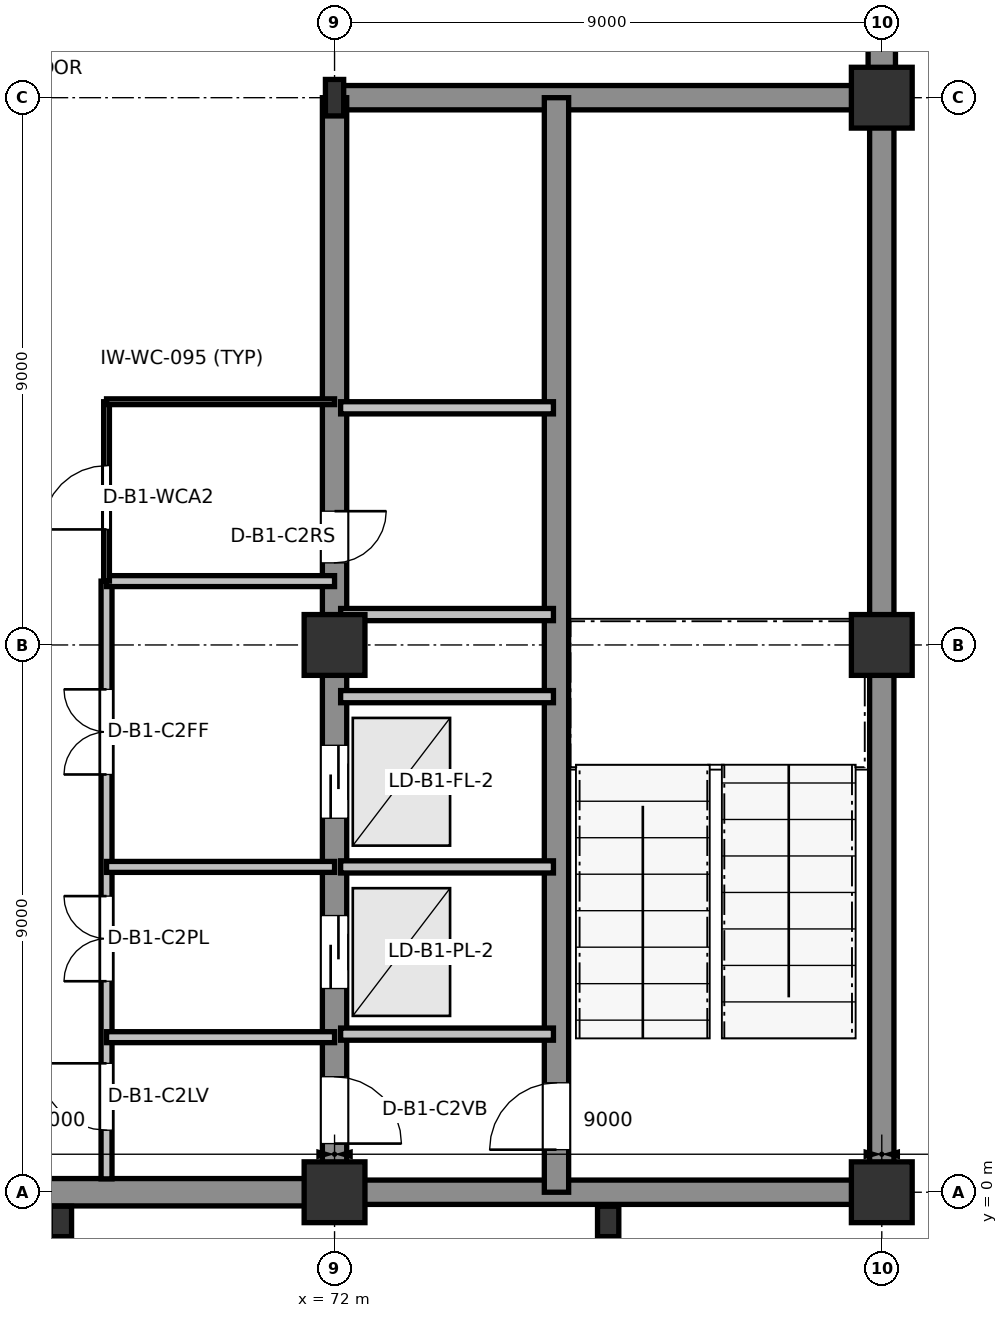
"""IFC4 building model, lengths in metres.
Left out: names, types, materials, properties, quantities, classifications, styles, units other than length and angle.
Written with IfcOpenShell. Run it as: python <this file> out.ifc"""

import sys

from ifc_helpers import new_model, si_unit, direction, frame, frame_2d, origin, origin_2d, place, context, subcontext, project, spatial, rectangle, i_section, extrude, element, fill, save


model = new_model("IFC4")
c1 = context("Model", 3, precision=1e-05, world=origin(), true_north=direction((0.0, 1.0)))
c2 = subcontext(c1, "Body", "Model", "MODEL_VIEW")
j1 = project(units=[si_unit("LENGTHUNIT", "METRE"), si_unit("PLANEANGLEUNIT", "RADIAN")], contexts=[c1])
p1 = place(None, origin())
s1 = spatial("IfcSite", under=j1, at=p1, CompositionType="ELEMENT")
p2 = place(p1, origin())
s2 = spatial("IfcBuilding", under=s1, at=p2, CompositionType="ELEMENT")
p3 = place(p2, frame((0.0, 0.0, -4.8)))
s3 = spatial("IfcBuildingStorey", under=s2, at=p3, CompositionType="ELEMENT", Elevation=-4.8)
for number, where, z_axis, x_axis in (
    (1, (67.5, -0.48, 0.0), (0.0, 0.0, 1.0), (1.0, 0.0, 0.0)),
    (2, (76.5, -0.48, 0.0), (0.0, 0.0, 1.0), (1.0, 0.0, 0.0)),
):
    element("IfcColumn", number, at=place(p3, frame(where, z_axis=z_axis, x_axis=x_axis)), inside=s3, PredefinedType="PILASTER", context=c2, shape_type="SweptSolid", body=[
        extrude(rectangle(XDim=0.35, YDim=0.5, at=origin_2d()), origin(), (0.0, 0.0, 1.0), 4.8),
    ])
for number, where, z_axis, x_axis in (
    (3, (72.0, 0.0, 0.0), (0.0, 0.0, 1.0), (1.0, 0.0, 0.0)),
    (4, (72.0, 9.0, 0.0), (0.0, 0.0, 1.0), (1.0, 0.0, 0.0)),
):
    element("IfcColumn", number, at=place(p3, frame(where, z_axis=z_axis, x_axis=x_axis)), inside=s3, PredefinedType="COLUMN", context=c2, shape_type="SweptSolid", body=[
        extrude(rectangle(XDim=1.0, YDim=1.0, at=origin_2d()), origin(), (0.0, 0.0, 1.0), 4.8),
    ])
p4 = place(p3, frame((72.0, 18.0, 0.0), z_axis=(0.0, 0.0, 1.0), x_axis=(1.0, 0.0, 0.0)))
e5 = element("IfcColumn", 5, at=p4, inside=s3, PredefinedType="COLUMN", context=c2, shape_type="SweptSolid", body=[
    extrude(i_section(OverallWidth=0.3, OverallDepth=0.6, WebThickness=0.015, FlangeThickness=0.03, at=origin_2d()), origin(), (0.0, 0.0, 1.0), 4.8),
])
for number, where, z_axis, x_axis in (
    (6, (81.0, 0.0, 0.0), (0.0, 0.0, 1.0), (1.0, 0.0, 0.0)),
    (7, (81.0, 9.0, 0.0), (0.0, 0.0, 1.0), (1.0, 0.0, 0.0)),
    (8, (81.0, 18.0, 0.0), (0.0, 0.0, 1.0), (1.0, 0.0, 0.0)),
):
    element("IfcColumn", number, at=place(p3, frame(where, z_axis=z_axis, x_axis=x_axis)), inside=s3, PredefinedType="COLUMN", context=c2, shape_type="SweptSolid", body=[
        extrude(rectangle(XDim=1.0, YDim=1.0, at=origin_2d()), origin(), (0.0, 0.0, 1.0), 4.8),
    ])
p5 = place(p3, frame((63.0, 0.0, 0.0), z_axis=(0.0, 0.0, 1.0), x_axis=(1.0, 0.0, 0.0)))
e9 = element("IfcWall", 9, at=p5, inside=s3, PredefinedType="USERDEFINED", context=c2, shape_type="SweptSolid", body=[
    extrude(rectangle(XDim=9.0, YDim=0.45, at=frame_2d((4.5, 0.0))), origin(), (0.0, 0.0, 1.0), 4.55),
])
p6 = place(p3, frame((81.0, 18.0, 0.0), z_axis=(0.0, 0.0, 1.0), x_axis=(0.0, 1.0, 0.0)))
e10 = element("IfcWall", 10, at=p6, inside=s3, PredefinedType="USERDEFINED", context=c2, shape_type="SweptSolid", body=[
    extrude(rectangle(XDim=3.0, YDim=0.45, at=frame_2d((1.5, 0.0))), origin(), (0.0, 0.0, 1.0), 4.55),
])
p7 = place(p3, frame((72.0, 0.0, 0.0), z_axis=(0.0, 0.0, 1.0), x_axis=(1.0, 0.0, 0.0)))
e11 = element("IfcWall", 11, at=p7, inside=s3, PredefinedType="SHEAR", context=c2, shape_type="SweptSolid", body=[
    extrude(rectangle(XDim=9.0, YDim=0.4, at=frame_2d((4.5, 0.0))), origin(), (0.0, 0.0, 1.0), 4.55),
])
p8 = place(p3, frame((81.0, 0.0, 0.0), z_axis=(0.0, 0.0, 1.0), x_axis=(0.0, 1.0, 0.0)))
e12 = element("IfcWall", 12, at=p8, inside=s3, PredefinedType="SHEAR", context=c2, shape_type="SweptSolid", body=[
    extrude(rectangle(XDim=18.0, YDim=0.4, at=frame_2d((9.0, 0.0))), origin(), (0.0, 0.0, 1.0), 4.55),
])
p9 = place(p3, frame((81.0, 18.0, 0.0), z_axis=(0.0, 0.0, 1.0), x_axis=(-1.0, 0.0, 0.0)))
e13 = element("IfcWall", 13, at=p9, inside=s3, PredefinedType="SHEAR", context=c2, shape_type="SweptSolid", body=[
    extrude(rectangle(XDim=9.0, YDim=0.4, at=frame_2d((4.5, 0.0))), origin(), (0.0, 0.0, 1.0), 4.55),
])
p10 = place(p3, frame((72.0, 18.0, 0.0), z_axis=(0.0, 0.0, 1.0), x_axis=(0.0, -1.0, 0.0)))
e14 = element("IfcWall", 14, at=p10, inside=s3, PredefinedType="SHEAR", context=c2, shape_type="SweptSolid", body=[
    extrude(rectangle(XDim=18.0, YDim=0.4, at=frame_2d((9.0, 0.0))), origin(), (0.0, 0.0, 1.0), 4.55),
])
p11 = place(p10, frame((16.1, 0.0, 0.0)))
e15 = element("IfcOpeningElement", 15, at=p11, cuts=e14, PredefinedType="OPENING", context=c2, shape_type="SweptSolid", body=[
    extrude(rectangle(XDim=1.1, YDim=2.16, at=frame_2d((0.55, 1.08))), frame((0.0, 0.21, 0.0), z_axis=(0.0, -1.0, 0.0), x_axis=(1.0, 0.0, 0.0)), (0.0, 0.0, 1.0), 0.42),
])
p12 = place(p10, frame((13.45, 0.0, 0.0)))
e16 = element("IfcOpeningElement", 16, at=p12, cuts=e14, PredefinedType="OPENING", context=c2, shape_type="SweptSolid", body=[
    extrude(rectangle(XDim=1.2, YDim=2.2, at=frame_2d((0.6, 1.1))), frame((0.0, 0.21, 0.0), z_axis=(0.0, -1.0, 0.0), x_axis=(1.0, 0.0, 0.0)), (0.0, 0.0, 1.0), 0.42),
])
p13 = place(p10, frame((10.65, 0.0, 0.0)))
e17 = element("IfcOpeningElement", 17, at=p13, cuts=e14, PredefinedType="OPENING", context=c2, shape_type="SweptSolid", body=[
    extrude(rectangle(XDim=1.2, YDim=2.2, at=frame_2d((0.6, 1.1))), frame((0.0, 0.21, 0.0), z_axis=(0.0, -1.0, 0.0), x_axis=(1.0, 0.0, 0.0)), (0.0, 0.0, 1.0), 0.42),
])
p14 = place(p10, frame((6.8, 0.0, 0.0)))
e18 = element("IfcOpeningElement", 18, at=p14, cuts=e14, PredefinedType="OPENING", context=c2, shape_type="SweptSolid", body=[
    extrude(rectangle(XDim=0.85, YDim=2.1, at=frame_2d((0.425, 1.05))), frame((0.0, 0.21, 0.0), z_axis=(0.0, -1.0, 0.0), x_axis=(1.0, 0.0, 0.0)), (0.0, 0.0, 1.0), 0.42),
])
p15 = place(p3, frame((75.65, 0.0, 0.0), z_axis=(0.0, 0.0, 1.0), x_axis=(0.0, 1.0, 0.0)))
e19 = element("IfcWall", 19, at=p15, inside=s3, PredefinedType="SHEAR", context=c2, shape_type="SweptSolid", body=[
    extrude(rectangle(XDim=18.0, YDim=0.4, at=frame_2d((9.0, 0.0))), origin(), (0.0, 0.0, 1.0), 4.55),
])
p16 = place(p15, frame((0.7, 0.0, 0.0)))
e20 = element("IfcOpeningElement", 20, at=p16, cuts=e19, PredefinedType="OPENING", context=c2, shape_type="SweptSolid", body=[
    extrude(rectangle(XDim=1.1, YDim=2.16, at=frame_2d((0.55, 1.08))), frame((0.0, 0.21, 0.0), z_axis=(0.0, -1.0, 0.0), x_axis=(1.0, 0.0, 0.0)), (0.0, 0.0, 1.0), 0.42),
])
for number, where, z_axis, x_axis in (
    (21, (72.1, 2.6, 0.0), (0.0, 0.0, 1.0), (1.0, 0.0, 0.0)),
    (22, (72.1, 5.35, 0.0), (0.0, 0.0, 1.0), (1.0, 0.0, 0.0)),
    (23, (72.1, 8.15, 0.0), (0.0, 0.0, 1.0), (1.0, 0.0, 0.0)),
    (24, (72.1, 9.5, 0.0), (0.0, 0.0, 1.0), (1.0, 0.0, 0.0)),
    (25, (72.1, 12.9, 0.0), (0.0, 0.0, 1.0), (1.0, 0.0, 0.0)),
):
    element("IfcWall", number, at=place(p3, frame(where, z_axis=z_axis, x_axis=x_axis)), inside=s3, PredefinedType="PARTITIONING", context=c2, shape_type="SweptSolid", body=[
        extrude(rectangle(XDim=3.5, YDim=0.2, at=frame_2d((1.75, 0.0))), origin(), (0.0, 0.0, 1.0), 4.55),
    ])
p17 = place(p3, frame((68.25, 0.22, 0.0), z_axis=(0.0, 0.0, 1.0), x_axis=(0.0, 1.0, 0.0)))
e26 = element("IfcWall", 26, at=p17, inside=s3, PredefinedType="PARTITIONING", context=c2, shape_type="SweptSolid", body=[
    extrude(rectangle(XDim=9.83, YDim=0.18, at=frame_2d((4.915, 0.0))), origin(), (0.0, 0.0, 1.0), 4.55),
])
p18 = place(p17, frame((0.8, 0.0, 0.0)))
e27 = element("IfcOpeningElement", 27, at=p18, cuts=e26, PredefinedType="OPENING", context=c2, shape_type="SweptSolid", body=[
    extrude(rectangle(XDim=1.1, YDim=2.16, at=frame_2d((0.55, 1.08))), frame((0.0, 0.1, 0.0), z_axis=(0.0, -1.0, 0.0), x_axis=(1.0, 0.0, 0.0)), (0.0, 0.0, 1.0), 0.2),
])
p19 = place(p17, frame((3.25, 0.0, 0.0)))
e28 = element("IfcOpeningElement", 28, at=p19, cuts=e26, PredefinedType="OPENING", context=c2, shape_type="SweptSolid", body=[
    extrude(rectangle(XDim=1.4, YDim=2.2, at=frame_2d((0.7, 1.1))), frame((0.0, 0.1, 0.0), z_axis=(0.0, -1.0, 0.0), x_axis=(1.0, 0.0, 0.0)), (0.0, 0.0, 1.0), 0.2),
])
p20 = place(p17, frame((6.65, 0.0, 0.0)))
e29 = element("IfcOpeningElement", 29, at=p20, cuts=e26, PredefinedType="OPENING", context=c2, shape_type="SweptSolid", body=[
    extrude(rectangle(XDim=1.4, YDim=2.2, at=frame_2d((0.7, 1.1))), frame((0.0, 0.1, 0.0), z_axis=(0.0, -1.0, 0.0), x_axis=(1.0, 0.0, 0.0)), (0.0, 0.0, 1.0), 0.2),
])
for number, where, z_axis, x_axis in (
    (30, (68.25, 2.55, 0.0), (0.0, 0.0, 1.0), (1.0, 0.0, 0.0)),
    (31, (68.25, 5.35, 0.0), (0.0, 0.0, 1.0), (1.0, 0.0, 0.0)),
    (32, (68.25, 10.05, 0.0), (0.0, 0.0, 1.0), (1.0, 0.0, 0.0)),
):
    element("IfcWall", number, at=place(p3, frame(where, z_axis=z_axis, x_axis=x_axis)), inside=s3, PredefinedType="PARTITIONING", context=c2, shape_type="SweptSolid", body=[
        extrude(rectangle(XDim=3.75, YDim=0.18, at=frame_2d((1.875, 0.0))), origin(), (0.0, 0.0, 1.0), 4.55),
    ])
p21 = place(p3, frame((68.25, 10.05, 0.0), z_axis=(0.0, 0.0, 1.0), x_axis=(0.0, 1.0, 0.0)))
e33 = element("IfcWall", 33, at=p21, inside=s3, PredefinedType="PARTITIONING", context=c2, shape_type="SweptSolid", body=[
    extrude(rectangle(XDim=2.95, YDim=0.095, at=frame_2d((1.475, 0.0))), origin(), (0.0, 0.0, 1.0), 4.55),
])
p22 = place(p21, frame((0.85, 0.0, 0.0)))
e34 = element("IfcOpeningElement", 34, at=p22, cuts=e33, PredefinedType="OPENING", context=c2, shape_type="SweptSolid", body=[
    extrude(rectangle(XDim=1.05, YDim=2.13, at=frame_2d((0.525, 1.065))), frame((0.0, 0.057, 0.0), z_axis=(0.0, -1.0, 0.0), x_axis=(1.0, 0.0, 0.0)), (0.0, 0.0, 1.0), 0.115),
])
p23 = place(p3, frame((68.25, 13.0, 0.0), z_axis=(0.0, 0.0, 1.0), x_axis=(1.0, 0.0, 0.0)))
e35 = element("IfcWall", 35, at=p23, inside=s3, PredefinedType="PARTITIONING", context=c2, shape_type="SweptSolid", body=[
    extrude(rectangle(XDim=3.75, YDim=0.095, at=frame_2d((1.875, 0.0))), origin(), (0.0, 0.0, 1.0), 4.55),
])
p24 = place(p16, origin())
e36 = element("IfcDoor", 36, at=p24, inside=s3, OperationType="SINGLE_SWING_LEFT", PredefinedType="DOOR", context=c2, shape_type="SweptSolid", body=[
    extrude(rectangle(XDim=1.1, YDim=2.16, at=frame_2d((0.55, 1.08))), frame((0.0, 0.025, 0.0), z_axis=(0.0, -1.0, 0.0), x_axis=(1.0, 0.0, 0.0)), (0.0, 0.0, 1.0), 0.05),
])
fill(e20, e36)
p25 = place(p11, origin())
e37 = element("IfcDoor", 37, at=p25, inside=s3, OperationType="SINGLE_SWING_RIGHT", PredefinedType="DOOR", context=c2, shape_type="SweptSolid", body=[
    extrude(rectangle(XDim=1.1, YDim=2.16, at=frame_2d((0.55, 1.08))), frame((0.0, 0.025, 0.0), z_axis=(0.0, -1.0, 0.0), x_axis=(1.0, 0.0, 0.0)), (0.0, 0.0, 1.0), 0.05),
])
fill(e15, e37)
p26 = place(p12, origin())
e38 = element("IfcDoor", 38, at=p26, inside=s3, OperationType="SLIDING_TO_LEFT", PredefinedType="DOOR", context=c2, shape_type="SweptSolid", body=[
    extrude(rectangle(XDim=1.2, YDim=2.2, at=frame_2d((0.6, 1.1))), frame((0.0, 0.025, 0.0), z_axis=(0.0, -1.0, 0.0), x_axis=(1.0, 0.0, 0.0)), (0.0, 0.0, 1.0), 0.05),
])
fill(e16, e38)
p27 = place(p13, origin())
e39 = element("IfcDoor", 39, at=p27, inside=s3, OperationType="SLIDING_TO_LEFT", PredefinedType="DOOR", context=c2, shape_type="SweptSolid", body=[
    extrude(rectangle(XDim=1.2, YDim=2.2, at=frame_2d((0.6, 1.1))), frame((0.0, 0.025, 0.0), z_axis=(0.0, -1.0, 0.0), x_axis=(1.0, 0.0, 0.0)), (0.0, 0.0, 1.0), 0.05),
])
fill(e17, e39)
p28 = place(p14, origin())
e40 = element("IfcDoor", 40, at=p28, inside=s3, OperationType="SINGLE_SWING_LEFT", PredefinedType="DOOR", context=c2, shape_type="SweptSolid", body=[
    extrude(rectangle(XDim=0.85, YDim=2.1, at=frame_2d((0.425, 1.05))), frame((0.0, 0.025, 0.0), z_axis=(0.0, -1.0, 0.0), x_axis=(1.0, 0.0, 0.0)), (0.0, 0.0, 1.0), 0.05),
])
fill(e18, e40)
p29 = place(p18, origin())
e41 = element("IfcDoor", 41, at=p29, inside=s3, OperationType="SINGLE_SWING_RIGHT", PredefinedType="DOOR", context=c2, shape_type="SweptSolid", body=[
    extrude(rectangle(XDim=1.1, YDim=2.16, at=frame_2d((0.55, 1.08))), frame((0.0, 0.025, 0.0), z_axis=(0.0, -1.0, 0.0), x_axis=(1.0, 0.0, 0.0)), (0.0, 0.0, 1.0), 0.05),
])
fill(e27, e41)
p30 = place(p19, origin())
e42 = element("IfcDoor", 42, at=p30, inside=s3, OperationType="DOUBLE_DOOR_SINGLE_SWING", PredefinedType="DOOR", context=c2, shape_type="SweptSolid", body=[
    extrude(rectangle(XDim=1.4, YDim=2.2, at=frame_2d((0.7, 1.1))), frame((0.0, 0.025, 0.0), z_axis=(0.0, -1.0, 0.0), x_axis=(1.0, 0.0, 0.0)), (0.0, 0.0, 1.0), 0.05),
])
fill(e28, e42)
p31 = place(p20, origin())
e43 = element("IfcDoor", 43, at=p31, inside=s3, OperationType="DOUBLE_DOOR_SINGLE_SWING", PredefinedType="DOOR", context=c2, shape_type="SweptSolid", body=[
    extrude(rectangle(XDim=1.4, YDim=2.2, at=frame_2d((0.7, 1.1))), frame((0.0, 0.025, 0.0), z_axis=(0.0, -1.0, 0.0), x_axis=(1.0, 0.0, 0.0)), (0.0, 0.0, 1.0), 0.05),
])
fill(e29, e43)
p32 = place(p22, origin())
e44 = element("IfcDoor", 44, at=p32, inside=s3, OperationType="SINGLE_SWING_LEFT", PredefinedType="DOOR", context=c2, shape_type="SweptSolid", body=[
    extrude(rectangle(XDim=1.05, YDim=2.13, at=frame_2d((0.525, 1.065))), frame((0.0, 0.025, 0.0), z_axis=(0.0, -1.0, 0.0), x_axis=(1.0, 0.0, 0.0)), (0.0, 0.0, 1.0), 0.05),
])
fill(e34, e44)
save(model, sys.argv[1])
